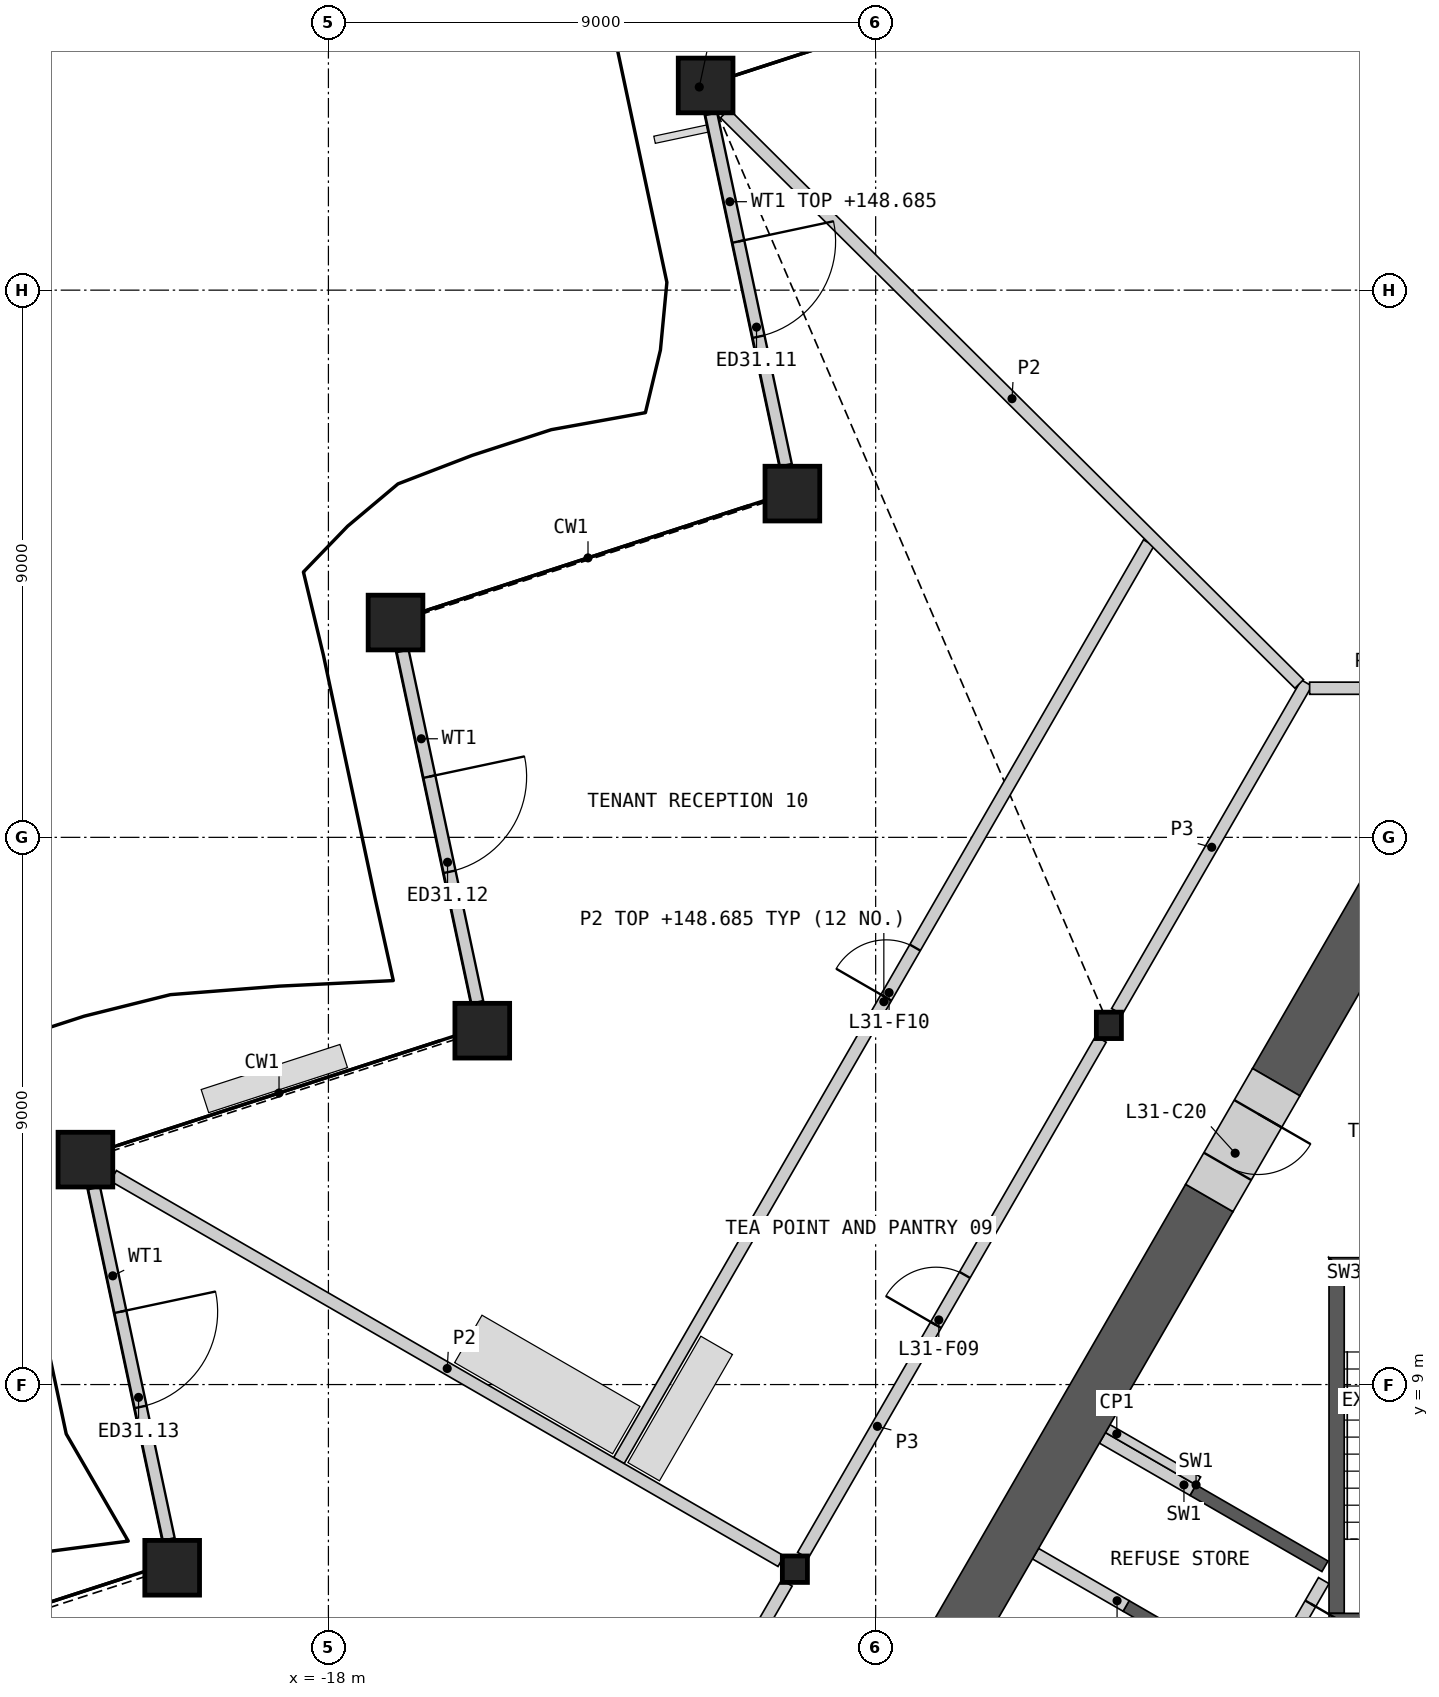
"""IFC4 building model, lengths in metres.
Left out: names, types, materials, properties, quantities, classifications, styles, units other than length and angle.
Written with IfcOpenShell. Run it as: python <this file> out.ifc"""

import sys

from ifc_helpers import new_model, si_unit, direction, frame, frame_2d, origin, origin_2d, place, context, subcontext, project, spatial, polyline, rectangle, hollow_rectangle, i_section, outline, extrude, element, fill, save


model = new_model("IFC4")
c1 = context("Model", 3, precision=1e-05, world=origin(), true_north=direction((0.0, 1.0)))
c2 = subcontext(c1, "Body", "Model", "MODEL_VIEW")
j1 = project(units=[si_unit("LENGTHUNIT", "METRE"), si_unit("PLANEANGLEUNIT", "RADIAN")], contexts=[c1])
p1 = place(None, origin())
s1 = spatial("IfcSite", under=j1, at=p1, CompositionType="ELEMENT")
p2 = place(p1, origin())
s2 = spatial("IfcBuilding", under=s1, at=p2, CompositionType="ELEMENT")
p3 = place(p2, frame((0.0, 0.0, 145.8)))
s3 = spatial("IfcBuildingStorey", under=s2, at=p3, CompositionType="ELEMENT", Elevation=145.8)
for number, where, z_axis, x_axis in (
    (1, (-11.796, 30.366, 0.0), (0.0, 0.0, 1.0), (1.0, 0.0, 0.0)),
    (2, (-10.37, 23.654, 0.0), (0.0, 0.0, 1.0), (1.0, 0.0, 0.0)),
    (3, (-16.896, 21.533, 0.0), (0.0, 0.0, 1.0), (1.0, 0.0, 0.0)),
    (4, (-15.469, 14.82, 0.0), (0.0, 0.0, 1.0), (1.0, 0.0, 0.0)),
    (5, (-21.996, 12.699, 0.0), (0.0, 0.0, 1.0), (1.0, 0.0, 0.0)),
    (6, (-20.57, 5.987, 0.0), (0.0, 0.0, 1.0), (1.0, 0.0, 0.0)),
):
    element("IfcColumn", number, at=place(p3, frame(where, z_axis=z_axis, x_axis=x_axis)), inside=s3, PredefinedType="COLUMN", context=c2, shape_type="SweptSolid", body=[
        extrude(hollow_rectangle(XDim=0.9, YDim=0.9, WallThickness=0.06, at=origin_2d()), origin(), (0.0, 0.0, 1.0), 4.2),
    ])
for number, where, z_axis, x_axis in (
    (7, (-5.164, 14.908, 0.0), (0.0, 0.0, 1.0), (1.0, 0.0, 0.0)),
    (8, (-10.328, 5.963, 0.0), (0.0, 0.0, 1.0), (1.0, 0.0, 0.0)),
):
    element("IfcColumn", number, at=place(p3, frame(where, z_axis=z_axis, x_axis=x_axis)), inside=s3, PredefinedType="COLUMN", context=c2, shape_type="SweptSolid", body=[
        extrude(i_section(OverallWidth=0.412, OverallDepth=0.435, WebThickness=0.036, FlangeThickness=0.057, at=origin_2d()), origin(), (0.0, 0.0, 1.0), 4.2),
    ])
p4 = place(p3, frame((-11.705, 29.9, 0.0), z_axis=(0.0, 0.0, 1.0), x_axis=(0.207917562075, -0.978146352741, 0.0)))
e9 = element("IfcWall", 9, at=p4, inside=s3, PredefinedType="SOLIDWALL", context=c2, shape_type="SweptSolid", body=[
    extrude(rectangle(XDim=5.909, YDim=0.2, at=frame_2d((2.954, 0.0))), origin(), (0.0, 0.0, 1.0), 2.885),
])
p5 = place(p4, frame((2.146, 0.0, 0.0)))
e10 = element("IfcOpeningElement", 10, at=p5, cuts=e9, PredefinedType="OPENING", context=c2, shape_type="SweptSolid", body=[
    extrude(rectangle(XDim=1.6, YDim=2.4, at=frame_2d((0.8, 1.2))), frame((0.0, 0.11, 0.0), z_axis=(0.0, -1.0, 0.0), x_axis=(1.0, 0.0, 0.0)), (0.0, 0.0, 1.0), 0.22),
])
p6 = place(p3, frame((-16.78, 21.066, 0.0), z_axis=(0.0, 0.0, 1.0), x_axis=(0.207917562075, -0.978146352741, 0.0)))
e11 = element("IfcWall", 11, at=p6, inside=s3, PredefinedType="SOLIDWALL", context=c2, shape_type="SweptSolid", body=[
    extrude(rectangle(XDim=5.909, YDim=0.2, at=frame_2d((2.954, 0.0))), origin(), (0.0, 0.0, 1.0), 3.189),
])
p7 = place(p6, frame((2.114, 0.0, 0.0)))
e12 = element("IfcOpeningElement", 12, at=p7, cuts=e11, PredefinedType="OPENING", context=c2, shape_type="SweptSolid", body=[
    extrude(rectangle(XDim=1.6, YDim=2.4, at=frame_2d((0.8, 1.2))), frame((0.0, 0.11, 0.0), z_axis=(0.0, -1.0, 0.0), x_axis=(1.0, 0.0, 0.0)), (0.0, 0.0, 1.0), 0.22),
])
p8 = place(p3, frame((-21.854, 12.233, 0.0), z_axis=(0.0, 0.0, 1.0), x_axis=(0.207925965623, -0.978144566421, 0.0)))
e13 = element("IfcWall", 13, at=p8, inside=s3, PredefinedType="SOLIDWALL", context=c2, shape_type="SweptSolid", body=[
    extrude(rectangle(XDim=5.908, YDim=0.2, at=frame_2d((2.954, 0.0))), origin(), (0.0, 0.0, 1.0), 3.189),
])
p9 = place(p8, frame((2.081, 0.0, 0.0)))
e14 = element("IfcOpeningElement", 14, at=p9, cuts=e13, PredefinedType="OPENING", context=c2, shape_type="SweptSolid", body=[
    extrude(rectangle(XDim=1.6, YDim=2.4, at=frame_2d((0.8, 1.2))), frame((0.0, 0.11, 0.0), z_axis=(0.0, -1.0, 0.0), x_axis=(1.0, 0.0, 0.0)), (0.0, 0.0, 1.0), 0.22),
])
p10 = place(p3, origin())
e15 = element("IfcWall", 15, at=p10, inside=s3, PredefinedType="SHEAR", context=c2, shape_type="SweptSolid", body=[
    extrude(outline(polyline([(-2.76, 4.019), (-4.931, 5.272), (-4.831, 5.445), (-2.66, 4.192), (-2.76, 4.019)])), origin(), (0.0, 0.0, 1.0), 3.8),
])
p11 = place(p3, origin())
e16 = element("IfcWall", 16, at=p11, inside=s3, PredefinedType="SHEAR", context=c2, shape_type="SweptSolid", body=[
    extrude(outline(polyline([(-3.731, 7.35), (-1.561, 6.097), (-1.66, 5.924), (-3.831, 7.177), (-3.731, 7.35)])), origin(), (0.0, 0.0, 1.0), 3.8),
])
p12 = place(p3, frame((-1.631, 5.776, 0.0), z_axis=(0.0, 0.0, 1.0), x_axis=(-0.499992876559, -0.866029516466, 0.0)))
e17 = element("IfcWall", 17, at=p12, inside=s3, PredefinedType="SOLIDWALL", context=c2, shape_type="SweptSolid", body=[
    extrude(rectangle(XDim=6.486, YDim=0.2, at=frame_2d((3.243, 0.0))), origin(), (0.0, 0.0, 1.0), 3.8),
])
p13 = place(p12, frame((0.437, 0.0, 0.0)))
e18 = element("IfcOpeningElement", 18, at=p13, cuts=e17, PredefinedType="OPENING", context=c2, shape_type="SweptSolid", body=[
    extrude(rectangle(XDim=0.9, YDim=2.1, at=frame_2d((0.45, 1.05))), frame((0.0, 0.11, 0.0), z_axis=(0.0, -1.0, 0.0), x_axis=(1.0, 0.0, 0.0)), (0.0, 0.0, 1.0), 0.22),
])
p14 = place(p12, frame((2.637, 0.0, 0.0)))
e19 = element("IfcOpeningElement", 19, at=p14, cuts=e17, PredefinedType="OPENING", context=c2, shape_type="SweptSolid", body=[
    extrude(rectangle(XDim=0.9, YDim=2.1, at=frame_2d((0.45, 1.05))), frame((0.0, 0.11, 0.0), z_axis=(0.0, -1.0, 0.0), x_axis=(1.0, 0.0, 0.0)), (0.0, 0.0, 1.0), 0.22),
])
for number, where, z_axis, x_axis in (
    (20, (-3.781, 7.263, 0.0), (0.0, 0.0, 1.0), (-0.866, 0.5, 0.0)),
    (21, (-4.881, 5.358, 0.0), (0.0, 0.0, 1.0), (-0.866, 0.5, 0.0)),
):
    element("IfcWall", number, at=place(p3, frame(where, z_axis=z_axis, x_axis=x_axis)), inside=s3, PredefinedType="SHEAR", context=c2, shape_type="SweptSolid", body=[
        extrude(rectangle(XDim=1.72, YDim=0.2, at=frame_2d((0.86, 0.0))), origin(), (0.0, 0.0, 1.0), 3.8),
    ])
p15 = place(p3, origin())
e22 = element("IfcWall", 22, at=p15, inside=s3, PredefinedType="SHEAR", context=c2, shape_type="SweptSolid", body=[
    extrude(outline(polyline([(1.544, 11.087), (-1.544, 11.087), (-1.294, 10.837), (1.294, 10.837), (1.544, 11.087)])), origin(), (0.0, 0.0, 1.0), 3.8),
])
p16 = place(p3, origin())
e23 = element("IfcWall", 23, at=p16, inside=s3, PredefinedType="SHEAR", context=c2, shape_type="SweptSolid", body=[
    extrude(outline(polyline([(-1.294, 10.837), (-1.544, 11.087), (-1.544, 5.237), (-1.294, 5.237), (-1.294, 10.837)])), origin(), (0.0, 0.0, 1.0), 3.8),
])
p17 = place(p3, frame((1.544, 5.112, 0.0), z_axis=(0.0, 0.0, 1.0), x_axis=(-1.0, 0.0, 0.0)))
e24 = element("IfcWall", 24, at=p17, inside=s3, PredefinedType="SHEAR", context=c2, shape_type="SweptSolid", body=[
    extrude(rectangle(XDim=3.088, YDim=0.25, at=frame_2d((1.544, 0.0))), origin(), (0.0, 0.0, 1.0), 3.8),
])
p18 = place(p17, frame((0.994, 0.0, 0.0)))
e25 = element("IfcOpeningElement", 25, at=p18, cuts=e24, PredefinedType="OPENING", context=c2, shape_type="SweptSolid", body=[
    extrude(rectangle(XDim=1.1, YDim=2.1, at=frame_2d((0.55, 1.05))), frame((0.0, 0.135, 0.0), z_axis=(0.0, -1.0, 0.0), x_axis=(1.0, 0.0, 0.0)), (0.0, 0.0, 1.0), 0.27),
])
p19 = place(p3, frame((-3.693, 7.415, 0.0), z_axis=(0.0, 0.0, 1.0), x_axis=(-0.866024871741, 0.500000921525, 0.0)))
e26 = element("IfcWall", 26, at=p19, inside=s3, PredefinedType="PARTITIONING", context=c2, shape_type="SweptSolid", body=[
    extrude(rectangle(XDim=1.72, YDim=0.15, at=frame_2d((0.86, 0.0))), origin(), (0.0, 0.0, 1.0), 3.8),
])
p20 = place(p3, frame((-3.512, 12.069, 0.0), z_axis=(0.0, 0.0, 1.0), x_axis=(-0.500002126466, -0.866024176065, 0.0)))
e27 = element("IfcWall", 27, at=p20, inside=s3, PredefinedType="SHEAR", context=c2, shape_type="SweptSolid", body=[
    extrude(rectangle(XDim=8.816, YDim=0.9, at=frame_2d((4.408, 0.0))), origin(), (0.0, 0.0, 1.0), 3.8),
])
p21 = place(p3, frame((-0.39, 17.478, 0.0), z_axis=(0.0, 0.0, 1.0), x_axis=(-0.500046330384, -0.865998653272, 0.0)))
e28 = element("IfcWall", 28, at=p21, inside=s3, PredefinedType="SHEAR", context=c2, shape_type="SweptSolid", body=[
    extrude(rectangle(XDim=4.045, YDim=0.9, at=frame_2d((2.023, 0.0))), origin(), (0.0, 0.0, 1.0), 3.8),
])
p22 = place(p3, frame((-2.413, 13.974, 0.0), z_axis=(0.0, 0.0, 1.0), x_axis=(-0.499946605688, -0.86605622881, 0.0)))
e29 = element("IfcWall", 29, at=p22, inside=s3, PredefinedType="SHEAR", context=c2, shape_type="SweptSolid", body=[
    extrude(rectangle(XDim=2.2, YDim=0.9, at=frame_2d((1.1, 0.0))), origin(), (0.0, 0.0, 1.0), 3.8),
])
p23 = place(p22, frame((0.6, 0.0, 0.0)))
e30 = element("IfcOpeningElement", 30, at=p23, cuts=e29, PredefinedType="OPENING", context=c2, shape_type="SweptSolid", body=[
    extrude(rectangle(XDim=1.0, YDim=2.1, at=frame_2d((0.5, 1.05))), frame((0.0, 0.46, 0.0), z_axis=(0.0, -1.0, 0.0), x_axis=(1.0, 0.0, 0.0)), (0.0, 0.0, 1.0), 0.92),
])
p24 = place(p3, frame((-15.361, -2.754, 0.0), z_axis=(0.0, 0.0, 1.0), x_axis=(0.500004141693, 0.866023012564, 0.0)))
e31 = element("IfcWall", 31, at=p24, inside=s3, PredefinedType="PARTITIONING", context=c2, shape_type="SweptSolid", body=[
    extrude(rectangle(XDim=9.803, YDim=0.2, at=frame_2d((4.902, 0.0))), origin(), (0.0, 0.0, 1.0), 3.8),
])
p25 = place(p24, frame((4.052, 0.0, 0.0)))
e32 = element("IfcOpeningElement", 32, at=p25, cuts=e31, PredefinedType="OPENING", context=c2, shape_type="SweptSolid", body=[
    extrude(rectangle(XDim=1.8, YDim=2.1, at=frame_2d((0.9, 1.05))), frame((0.0, 0.11, 0.0), z_axis=(0.0, -1.0, 0.0), x_axis=(1.0, 0.0, 0.0)), (0.0, 0.0, 1.0), 0.22),
])
p26 = place(p3, frame((-10.197, 6.19, 0.0), z_axis=(0.0, 0.0, 1.0), x_axis=(0.500012035596, 0.866018454918, 0.0)))
e33 = element("IfcWall", 33, at=p26, inside=s3, PredefinedType="PARTITIONING", context=c2, shape_type="SweptSolid", body=[
    extrude(rectangle(XDim=9.803, YDim=0.2, at=frame_2d((4.902, 0.0))), origin(), (0.0, 0.0, 1.0), 3.8),
])
p27 = place(p26, frame((4.376, 0.0, 0.0)))
e34 = element("IfcOpeningElement", 34, at=p27, cuts=e33, PredefinedType="OPENING", context=c2, shape_type="SweptSolid", body=[
    extrude(rectangle(XDim=0.95, YDim=2.1, at=frame_2d((0.475, 1.05))), frame((0.0, 0.11, 0.0), z_axis=(0.0, -1.0, 0.0), x_axis=(1.0, 0.0, 0.0)), (0.0, 0.0, 1.0), 0.22),
])
p28 = place(p3, frame((-5.033, 15.135, 0.0), z_axis=(0.0, 0.0, 1.0), x_axis=(0.499980978912, 0.866036385336, 0.0)))
e35 = element("IfcWall", 35, at=p28, inside=s3, PredefinedType="PARTITIONING", context=c2, shape_type="SweptSolid", body=[
    extrude(rectangle(XDim=6.24, YDim=0.2, at=frame_2d((3.12, 0.0))), origin(), (0.0, 0.0, 1.0), 3.8),
])
p29 = place(p3, frame((-1.863, 20.453, 0.0), z_axis=(0.0, 0.0, 1.0), x_axis=(1.0, 0.0, 0.0)))
e36 = element("IfcWall", 36, at=p29, inside=s3, PredefinedType="PARTITIONING", context=c2, shape_type="SweptSolid", body=[
    extrude(rectangle(XDim=3.726, YDim=0.2, at=frame_2d((1.863, 0.0))), origin(), (0.0, 0.0, 1.0), 3.8),
])
p30 = place(p29, frame((1.363, 0.0, 0.0)))
e37 = element("IfcOpeningElement", 37, at=p30, cuts=e36, PredefinedType="OPENING", context=c2, shape_type="SweptSolid", body=[
    extrude(rectangle(XDim=1.0, YDim=2.1, at=frame_2d((0.5, 1.05))), frame((0.0, 0.11, 0.0), z_axis=(0.0, -1.0, 0.0), x_axis=(1.0, 0.0, 0.0)), (0.0, 0.0, 1.0), 0.22),
])
p31 = place(p3, frame((-13.223, 7.75, 0.0), z_axis=(0.0, 0.0, 1.0), x_axis=(0.499991226912, 0.86603046887, 0.0)))
e38 = element("IfcWall", 38, at=p31, inside=s3, PredefinedType="PARTITIONING", context=c2, shape_type="SweptSolid", body=[
    extrude(rectangle(XDim=17.429, YDim=0.2, at=frame_2d((8.715, 0.0))), origin(), (0.0, 0.0, 1.0), 2.885),
])
p32 = place(p31, frame((8.792, 0.0, 0.0)))
e39 = element("IfcOpeningElement", 39, at=p32, cuts=e38, PredefinedType="OPENING", context=c2, shape_type="SweptSolid", body=[
    extrude(rectangle(XDim=0.95, YDim=2.1, at=frame_2d((0.475, 1.05))), frame((0.0, 0.11, 0.0), z_axis=(0.0, -1.0, 0.0), x_axis=(1.0, 0.0, 0.0)), (0.0, 0.0, 1.0), 0.22),
])
p33 = place(p3, frame((-11.481, 29.906, 0.0), z_axis=(0.0, 0.0, 1.0), x_axis=(0.709504632293, -0.704700771076, 0.0)))
e40 = element("IfcWall", 40, at=p33, inside=s3, PredefinedType="PARTITIONING", context=c2, shape_type="SweptSolid", body=[
    extrude(rectangle(XDim=13.315, YDim=0.2, at=frame_2d((6.658, 0.0))), origin(), (0.0, 0.0, 1.0), 2.885),
])
p34 = place(p3, frame((-21.536, 12.434, 0.0), z_axis=(0.0, 0.0, 1.0), x_axis=(0.86602461759, -0.500001361726, 0.0)))
e41 = element("IfcWall", 41, at=p34, inside=s3, PredefinedType="PARTITIONING", context=c2, shape_type="SweptSolid", body=[
    extrude(rectangle(XDim=12.679, YDim=0.2, at=frame_2d((6.34, 0.0))), origin(), (0.0, 0.0, 1.0), 2.885),
])
p35 = place(p5, origin())
e42 = element("IfcDoor", 42, at=p35, inside=s3, OperationType="DOUBLE_DOOR_SINGLE_SWING", PredefinedType="DOOR", context=c2, shape_type="SweptSolid", body=[
    extrude(rectangle(XDim=1.6, YDim=2.4, at=frame_2d((0.8, 1.2))), frame((0.0, 0.025, 0.0), z_axis=(0.0, -1.0, 0.0), x_axis=(1.0, 0.0, 0.0)), (0.0, 0.0, 1.0), 0.05),
])
fill(e10, e42)
p36 = place(p7, origin())
e43 = element("IfcDoor", 43, at=p36, inside=s3, OperationType="DOUBLE_DOOR_SINGLE_SWING", PredefinedType="DOOR", context=c2, shape_type="SweptSolid", body=[
    extrude(rectangle(XDim=1.6, YDim=2.4, at=frame_2d((0.8, 1.2))), frame((0.0, 0.025, 0.0), z_axis=(0.0, -1.0, 0.0), x_axis=(1.0, 0.0, 0.0)), (0.0, 0.0, 1.0), 0.05),
])
fill(e12, e43)
p37 = place(p9, origin())
e44 = element("IfcDoor", 44, at=p37, inside=s3, OperationType="DOUBLE_DOOR_SINGLE_SWING", PredefinedType="DOOR", context=c2, shape_type="SweptSolid", body=[
    extrude(rectangle(XDim=1.6, YDim=2.4, at=frame_2d((0.8, 1.2))), frame((0.0, 0.025, 0.0), z_axis=(0.0, -1.0, 0.0), x_axis=(1.0, 0.0, 0.0)), (0.0, 0.0, 1.0), 0.05),
])
fill(e14, e44)
p38 = place(p13, origin())
e45 = element("IfcDoor", 45, at=p38, inside=s3, OperationType="SINGLE_SWING_LEFT", PredefinedType="DOOR", context=c2, shape_type="SweptSolid", body=[
    extrude(rectangle(XDim=0.9, YDim=2.1, at=frame_2d((0.45, 1.05))), frame((0.0, 0.025, 0.0), z_axis=(0.0, -1.0, 0.0), x_axis=(1.0, 0.0, 0.0)), (0.0, 0.0, 1.0), 0.05),
])
fill(e18, e45)
p39 = place(p23, origin())
e46 = element("IfcDoor", 46, at=p39, inside=s3, OperationType="SINGLE_SWING_LEFT", PredefinedType="DOOR", context=c2, shape_type="SweptSolid", body=[
    extrude(rectangle(XDim=1.0, YDim=2.1, at=frame_2d((0.5, 1.05))), frame((0.0, 0.205, 0.0), z_axis=(0.0, -1.0, 0.0), x_axis=(1.0, 0.0, 0.0)), (0.0, 0.0, 1.0), 0.05),
])
fill(e30, e46)
p40 = place(p27, origin())
e47 = element("IfcDoor", 47, at=p40, inside=s3, OperationType="SINGLE_SWING_LEFT", PredefinedType="DOOR", context=c2, shape_type="SweptSolid", body=[
    extrude(rectangle(XDim=0.95, YDim=2.1, at=frame_2d((0.475, 1.05))), frame((0.0, 0.025, 0.0), z_axis=(0.0, -1.0, 0.0), x_axis=(1.0, 0.0, 0.0)), (0.0, 0.0, 1.0), 0.05),
])
fill(e34, e47)
p41 = place(p32, origin())
e48 = element("IfcDoor", 48, at=p41, inside=s3, OperationType="SINGLE_SWING_LEFT", PredefinedType="DOOR", context=c2, shape_type="SweptSolid", body=[
    extrude(rectangle(XDim=0.95, YDim=2.1, at=frame_2d((0.475, 1.05))), frame((0.0, 0.025, 0.0), z_axis=(0.0, -1.0, 0.0), x_axis=(1.0, 0.0, 0.0)), (0.0, 0.0, 1.0), 0.05),
])
fill(e39, e48)
save(model, sys.argv[1])
